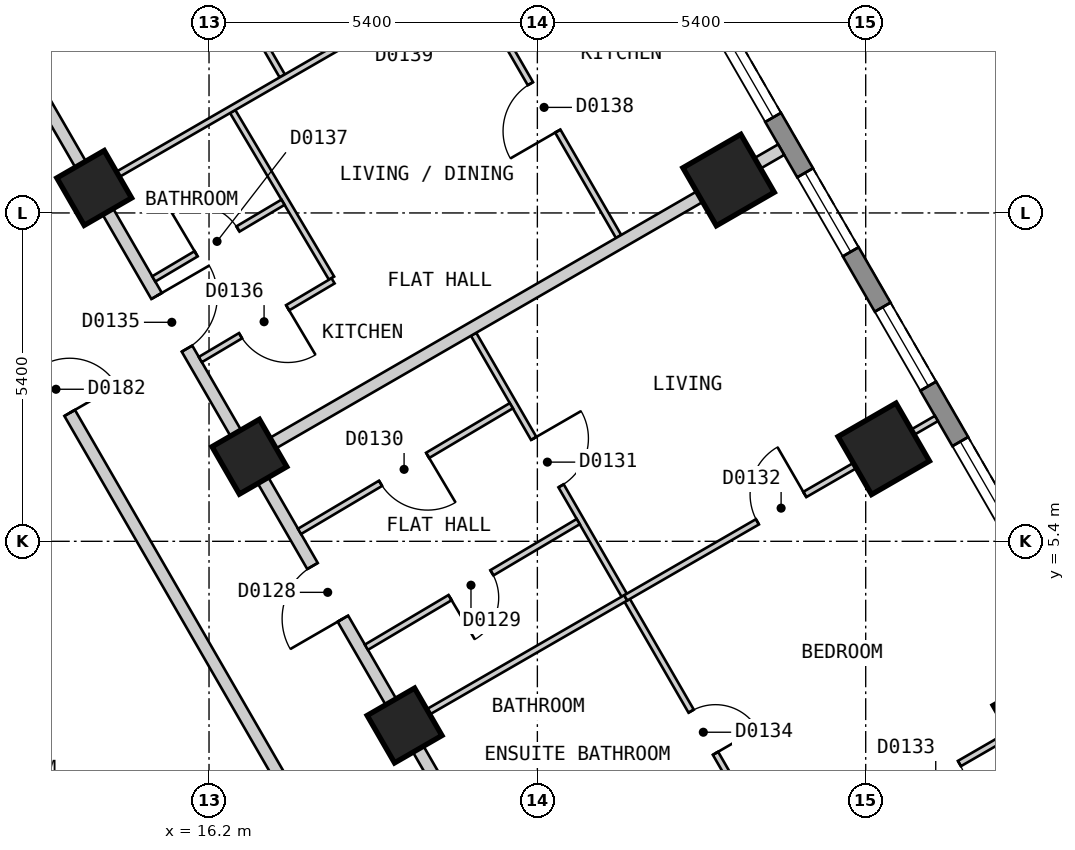
"""IFC4 building model, lengths in metres.
Left out: names, types, materials, properties, quantities, classifications, styles, units other than length and angle.
Written with IfcOpenShell. Run it as: python <this file> out.ifc"""

import sys

from ifc_helpers import new_model, si_unit, direction, frame, frame_2d, origin, origin_2d, place, context, subcontext, project, spatial, polyline, rectangle, outline, extrude, element, fill, save


model = new_model("IFC4")
c1 = context("Model", 3, precision=1e-05, world=origin(), true_north=direction((0.0, 1.0)))
c2 = subcontext(c1, "Body", "Model", "MODEL_VIEW")
j1 = project(units=[si_unit("LENGTHUNIT", "METRE"), si_unit("PLANEANGLEUNIT", "RADIAN")], contexts=[c1])
p1 = place(None, origin())
s1 = spatial("IfcSite", under=j1, at=p1, CompositionType="ELEMENT")
p2 = place(p1, origin())
s2 = spatial("IfcBuilding", under=s1, at=p2, CompositionType="ELEMENT")
p3 = place(p2, frame((0.0, 0.0, 29.4)))
s3 = spatial("IfcBuildingStorey", under=s2, at=p3, CompositionType="ELEMENT", Elevation=29.4)
for number, where, z_axis, x_axis in (
    (1, (29.848, 2.5, 0.0), (0.0, 0.0, 1.0), (-0.5, 0.866, 0.0)),
    (2, (27.297, 6.921, 0.0), (0.0, 0.0, 1.0), (-0.5, 0.866, 0.0)),
    (3, (24.745, 11.341, 0.0), (0.0, 0.0, 1.0), (-0.5, 0.866, 0.0)),
):
    element("IfcColumn", number, at=place(p3, frame(where, z_axis=z_axis, x_axis=x_axis)), inside=s3, PredefinedType="COLUMN", context=c2, shape_type="SweptSolid", body=[
        extrude(rectangle(XDim=1.1, YDim=1.1, at=origin_2d()), origin(), (0.0, 0.0, 1.0), 3.0),
    ])
for number, where, z_axis, x_axis in (
    (4, (19.416, 2.371, 0.0), (0.0, 0.0, 1.0), (-0.5, 0.866, 0.0)),
    (5, (16.864, 6.791, 0.0), (0.0, 0.0, 1.0), (-0.5, 0.866, 0.0)),
    (6, (14.312, 11.211, 0.0), (0.0, 0.0, 1.0), (-0.5, 0.866, 0.0)),
):
    element("IfcColumn", number, at=place(p3, frame(where, z_axis=z_axis, x_axis=x_axis)), inside=s3, PredefinedType="COLUMN", context=c2, shape_type="SweptSolid", body=[
        extrude(rectangle(XDim=0.9, YDim=0.9, at=origin_2d()), origin(), (0.0, 0.0, 1.0), 3.0),
    ])
p4 = place(p3, frame((31.22, 2.425, 0.0), z_axis=(0.0, 0.0, 1.0), x_axis=(-0.500001938803, 0.866024284413, 0.0)))
e7 = element("IfcWall", 7, at=p4, inside=s3, PredefinedType="SOLIDWALL", context=c2, shape_type="SweptSolid", body=[
    extrude(outline(polyline([(0.0, -0.15), (27.02, -0.15), (26.94, 0.15), (0.08, 0.15), (0.0, -0.15)])), origin(), (0.0, 0.0, 1.0), 2.7),
])
p5 = place(p4, frame((1.277, 0.0, 0.15)))
e8 = element("IfcOpeningElement", 8, at=p5, cuts=e7, PredefinedType="OPENING", context=c2, shape_type="SweptSolid", body=[
    extrude(rectangle(XDim=1.5, YDim=2.1, at=frame_2d((0.75, 1.05))), frame((0.0, 0.16, 0.0), z_axis=(0.0, -1.0, 0.0), x_axis=(1.0, 0.0, 0.0)), (0.0, 0.0, 1.0), 0.32),
])
p6 = place(p4, frame((3.829, 0.0, 0.15)))
e9 = element("IfcOpeningElement", 9, at=p6, cuts=e7, PredefinedType="OPENING", context=c2, shape_type="SweptSolid", body=[
    extrude(rectangle(XDim=1.5, YDim=2.1, at=frame_2d((0.75, 1.05))), frame((0.0, 0.16, 0.0), z_axis=(0.0, -1.0, 0.0), x_axis=(1.0, 0.0, 0.0)), (0.0, 0.0, 1.0), 0.32),
])
p7 = place(p4, frame((6.382, 0.0, 0.15)))
e10 = element("IfcOpeningElement", 10, at=p7, cuts=e7, PredefinedType="OPENING", context=c2, shape_type="SweptSolid", body=[
    extrude(rectangle(XDim=1.5, YDim=2.1, at=frame_2d((0.75, 1.05))), frame((0.0, 0.16, 0.0), z_axis=(0.0, -1.0, 0.0), x_axis=(1.0, 0.0, 0.0)), (0.0, 0.0, 1.0), 0.32),
])
p8 = place(p4, frame((8.933, 0.0, 0.15)))
e11 = element("IfcOpeningElement", 11, at=p8, cuts=e7, PredefinedType="OPENING", context=c2, shape_type="SweptSolid", body=[
    extrude(rectangle(XDim=1.5, YDim=2.1, at=frame_2d((0.75, 1.05))), frame((0.0, 0.16, 0.0), z_axis=(0.0, -1.0, 0.0), x_axis=(1.0, 0.0, 0.0)), (0.0, 0.0, 1.0), 0.32),
])
p9 = place(p4, frame((11.485, 0.0, 0.15)))
e12 = element("IfcOpeningElement", 12, at=p9, cuts=e7, PredefinedType="OPENING", context=c2, shape_type="SweptSolid", body=[
    extrude(rectangle(XDim=1.5, YDim=2.1, at=frame_2d((0.75, 1.05))), frame((0.0, 0.16, 0.0), z_axis=(0.0, -1.0, 0.0), x_axis=(1.0, 0.0, 0.0)), (0.0, 0.0, 1.0), 0.32),
])
p10 = place(p4, frame((14.037, 0.0, 0.15)))
e13 = element("IfcOpeningElement", 13, at=p10, cuts=e7, PredefinedType="OPENING", context=c2, shape_type="SweptSolid", body=[
    extrude(rectangle(XDim=1.5, YDim=2.1, at=frame_2d((0.75, 1.05))), frame((0.0, 0.16, 0.0), z_axis=(0.0, -1.0, 0.0), x_axis=(1.0, 0.0, 0.0)), (0.0, 0.0, 1.0), 0.32),
])
p11 = place(p4, frame((16.589, 0.0, 0.15)))
e14 = element("IfcOpeningElement", 14, at=p11, cuts=e7, PredefinedType="OPENING", context=c2, shape_type="SweptSolid", body=[
    extrude(rectangle(XDim=1.5, YDim=2.1, at=frame_2d((0.75, 1.05))), frame((0.0, 0.16, 0.0), z_axis=(0.0, -1.0, 0.0), x_axis=(1.0, 0.0, 0.0)), (0.0, 0.0, 1.0), 0.32),
])
p12 = place(p4, frame((19.141, 0.0, 0.15)))
e15 = element("IfcOpeningElement", 15, at=p12, cuts=e7, PredefinedType="OPENING", context=c2, shape_type="SweptSolid", body=[
    extrude(rectangle(XDim=1.5, YDim=2.1, at=frame_2d((0.75, 1.05))), frame((0.0, 0.16, 0.0), z_axis=(0.0, -1.0, 0.0), x_axis=(1.0, 0.0, 0.0)), (0.0, 0.0, 1.0), 0.32),
])
p13 = place(p4, frame((21.693, 0.0, 0.15)))
e16 = element("IfcOpeningElement", 16, at=p13, cuts=e7, PredefinedType="OPENING", context=c2, shape_type="SweptSolid", body=[
    extrude(rectangle(XDim=1.5, YDim=2.1, at=frame_2d((0.75, 1.05))), frame((0.0, 0.16, 0.0), z_axis=(0.0, -1.0, 0.0), x_axis=(1.0, 0.0, 0.0)), (0.0, 0.0, 1.0), 0.32),
])
p14 = place(p4, frame((24.244, 0.0, 0.15)))
e17 = element("IfcOpeningElement", 17, at=p14, cuts=e7, PredefinedType="OPENING", context=c2, shape_type="SweptSolid", body=[
    extrude(rectangle(XDim=1.5, YDim=2.1, at=frame_2d((0.75, 1.05))), frame((0.0, 0.16, 0.0), z_axis=(0.0, -1.0, 0.0), x_axis=(1.0, 0.0, 0.0)), (0.0, 0.0, 1.0), 0.32),
])
p15 = place(p3, frame((9.18, 15.7, 0.0), z_axis=(0.0, 0.0, 1.0), x_axis=(0.500003652032, -0.866023295272, 0.0)))
e18 = element("IfcWall", 18, at=p15, inside=s3, PredefinedType="PARTITIONING", context=c2, shape_type="SweptSolid", body=[
    extrude(rectangle(XDim=18.012, YDim=0.2, at=frame_2d((9.006, 0.0))), origin(), (0.0, 0.0, 1.0), 2.7),
])
p16 = place(p15, frame((8.556, 0.0, 0.0)))
e19 = element("IfcOpeningElement", 19, at=p16, cuts=e18, PredefinedType="OPENING", context=c2, shape_type="SweptSolid", body=[
    extrude(rectangle(XDim=0.9, YDim=2.1, at=frame_2d((0.45, 1.05))), frame((0.0, 0.11, 0.0), z_axis=(0.0, -1.0, 0.0), x_axis=(1.0, 0.0, 0.0)), (0.0, 0.0, 1.0), 0.22),
])
p17 = place(p3, frame((10.45, 17.9, 0.0), z_axis=(0.0, 0.0, 1.0), x_axis=(0.500034352617, -0.866005569383, 0.0)))
e20 = element("IfcWall", 20, at=p17, inside=s3, PredefinedType="PARTITIONING", context=c2, shape_type="SweptSolid", body=[
    extrude(rectangle(XDim=20.553, YDim=0.2, at=frame_2d((10.276, 0.0))), origin(), (0.0, 0.0, 1.0), 2.7),
])
p18 = place(p17, frame((14.903, 0.0, 0.0)))
e21 = element("IfcOpeningElement", 21, at=p18, cuts=e20, PredefinedType="OPENING", context=c2, shape_type="SweptSolid", body=[
    extrude(rectangle(XDim=1.0, YDim=2.1, at=frame_2d((0.5, 1.05))), frame((0.0, 0.11, 0.0), z_axis=(0.0, -1.0, 0.0), x_axis=(1.0, 0.0, 0.0)), (0.0, 0.0, 1.0), 0.22),
])
p19 = place(p17, frame((9.775, 0.0, 0.0)))
e22 = element("IfcOpeningElement", 22, at=p19, cuts=e20, PredefinedType="OPENING", context=c2, shape_type="SweptSolid", body=[
    extrude(rectangle(XDim=1.0, YDim=2.1, at=frame_2d((0.5, 1.05))), frame((0.0, 0.11, 0.0), z_axis=(0.0, -1.0, 0.0), x_axis=(1.0, 0.0, 0.0)), (0.0, 0.0, 1.0), 0.22),
])
p20 = place(p3, frame((16.589, 12.468, 0.0), z_axis=(0.0, 0.0, 1.0), x_axis=(0.510331599186, -0.859977708358, 0.0)))
e23 = element("IfcWall", 23, at=p20, inside=s3, PredefinedType="PARTITIONING", context=c2, shape_type="SweptSolid", body=[
    extrude(rectangle(XDim=3.186, YDim=0.1, at=frame_2d((1.593, 0.0))), origin(), (0.0, 0.0, 1.0), 2.7),
])
p21 = place(p3, frame((14.928, 17.344, 0.0), z_axis=(0.0, 0.0, 1.0), x_axis=(0.499881743012, -0.866093668724, 0.0)))
e24 = element("IfcWall", 24, at=p21, inside=s3, PredefinedType="PARTITIONING", context=c2, shape_type="SweptSolid", body=[
    extrude(rectangle(XDim=4.953, YDim=0.1, at=frame_2d((2.477, 0.0))), origin(), (0.0, 0.0, 1.0), 2.7),
])
p22 = place(p21, frame((2.052, 0.0, 0.0)))
e25 = element("IfcOpeningElement", 25, at=p22, cuts=e24, PredefinedType="OPENING", context=c2, shape_type="SweptSolid", body=[
    extrude(rectangle(XDim=0.8, YDim=2.1, at=frame_2d((0.4, 1.05))), frame((0.0, 0.06, 0.0), z_axis=(0.0, -1.0, 0.0), x_axis=(1.0, 0.0, 0.0)), (0.0, 0.0, 1.0), 0.12),
])
p23 = place(p3, frame((20.551, 8.805, 0.0), z_axis=(0.0, 0.0, 1.0), x_axis=(0.499984387913, -0.86603441724, 0.0)))
e26 = element("IfcWall", 26, at=p23, inside=s3, PredefinedType="PARTITIONING", context=c2, shape_type="SweptSolid", body=[
    extrude(rectangle(XDim=10.058, YDim=0.1, at=frame_2d((5.029, 0.0))), origin(), (0.0, 0.0, 1.0), 2.7),
])
p24 = place(p23, frame((1.978, 0.0, 0.0)))
e27 = element("IfcOpeningElement", 27, at=p24, cuts=e26, PredefinedType="OPENING", context=c2, shape_type="SweptSolid", body=[
    extrude(rectangle(XDim=0.9, YDim=2.1, at=frame_2d((0.45, 1.05))), frame((0.0, 0.06, 0.0), z_axis=(0.0, -1.0, 0.0), x_axis=(1.0, 0.0, 0.0)), (0.0, 0.0, 1.0), 0.12),
])
p25 = place(p23, frame((7.157, 0.0, 0.0)))
e28 = element("IfcOpeningElement", 28, at=p25, cuts=e26, PredefinedType="OPENING", context=c2, shape_type="SweptSolid", body=[
    extrude(rectangle(XDim=0.8, YDim=2.1, at=frame_2d((0.4, 1.05))), frame((0.0, 0.06, 0.0), z_axis=(0.0, -1.0, 0.0), x_axis=(1.0, 0.0, 0.0)), (0.0, 0.0, 1.0), 0.12),
])
p26 = place(p3, frame((20.46, 14.703, 0.0), z_axis=(0.0, 0.0, 1.0), x_axis=(0.499903082856, -0.866081351693, 0.0)))
e29 = element("IfcWall", 29, at=p26, inside=s3, PredefinedType="PARTITIONING", context=c2, shape_type="SweptSolid", body=[
    extrude(rectangle(XDim=4.953, YDim=0.1, at=frame_2d((2.477, 0.0))), origin(), (0.0, 0.0, 1.0), 2.7),
])
p27 = place(p26, frame((2.052, 0.0, 0.0)))
e30 = element("IfcOpeningElement", 30, at=p27, cuts=e29, PredefinedType="OPENING", context=c2, shape_type="SweptSolid", body=[
    extrude(rectangle(XDim=0.9, YDim=2.1, at=frame_2d((0.45, 1.05))), frame((0.0, 0.06, 0.0), z_axis=(0.0, -1.0, 0.0), x_axis=(1.0, 0.0, 0.0)), (0.0, 0.0, 1.0), 0.12),
])
p28 = place(p3, frame((19.503, 2.421, 0.0), z_axis=(0.0, 0.0, 1.0), x_axis=(0.866083434238, 0.499899474834, 0.0)))
e31 = element("IfcWall", 31, at=p28, inside=s3, PredefinedType="PARTITIONING", context=c2, shape_type="SweptSolid", body=[
    extrude(rectangle(XDim=4.099, YDim=0.1, at=frame_2d((2.049, 0.0))), origin(), (0.0, 0.0, 1.0), 2.7),
])
p29 = place(p3, frame((25.588, 0.041, 0.0), z_axis=(0.0, 0.0, 1.0), x_axis=(0.866113484451, 0.499847408768, 0.0)))
e32 = element("IfcWall", 32, at=p29, inside=s3, PredefinedType="PARTITIONING", context=c2, shape_type="SweptSolid", body=[
    extrude(rectangle(XDim=5.92, YDim=0.1, at=frame_2d((2.96, 0.0))), origin(), (0.0, 0.0, 1.0), 2.7),
])
p30 = place(p29, frame((2.51, 0.0, 0.0)))
e33 = element("IfcOpeningElement", 33, at=p30, cuts=e32, PredefinedType="OPENING", context=c2, shape_type="SweptSolid", body=[
    extrude(rectangle(XDim=0.9, YDim=2.1, at=frame_2d((0.45, 1.05))), frame((0.0, 0.06, 0.0), z_axis=(0.0, -1.0, 0.0), x_axis=(1.0, 0.0, 0.0)), (0.0, 0.0, 1.0), 0.12),
])
p31 = place(p3, frame((14.399, 11.261, 0.0), z_axis=(0.0, 0.0, 1.0), x_axis=(0.866022959057, 0.500004234368, 0.0)))
e34 = element("IfcWall", 34, at=p31, inside=s3, PredefinedType="PARTITIONING", context=c2, shape_type="SweptSolid", body=[
    extrude(rectangle(XDim=10.0, YDim=0.1, at=frame_2d((5.0, 0.0))), origin(), (0.0, 0.0, 1.0), 2.7),
])
p32 = place(p31, frame((4.775, 0.0, 0.0)))
e35 = element("IfcOpeningElement", 35, at=p32, cuts=e34, PredefinedType="OPENING", context=c2, shape_type="SweptSolid", body=[
    extrude(rectangle(XDim=0.9, YDim=2.1, at=frame_2d((0.45, 1.05))), frame((0.0, 0.06, 0.0), z_axis=(0.0, -1.0, 0.0), x_axis=(1.0, 0.0, 0.0)), (0.0, 0.0, 1.0), 0.12),
])
p33 = place(p3, frame((17.688, 5.563, 0.0), z_axis=(0.0, 0.0, 1.0), x_axis=(0.860050619918, 0.510208713351, 0.0)))
e36 = element("IfcWall", 36, at=p33, inside=s3, PredefinedType="PARTITIONING", context=c2, shape_type="SweptSolid", body=[
    extrude(rectangle(XDim=4.051, YDim=0.1, at=frame_2d((2.025, 0.0))), origin(), (0.0, 0.0, 1.0), 2.7),
])
p34 = place(p33, frame((1.55, 0.0, 0.0)))
e37 = element("IfcOpeningElement", 37, at=p34, cuts=e36, PredefinedType="OPENING", context=c2, shape_type="SweptSolid", body=[
    extrude(rectangle(XDim=0.9, YDim=2.1, at=frame_2d((0.45, 1.05))), frame((0.0, 0.06, 0.0), z_axis=(0.0, -1.0, 0.0), x_axis=(1.0, 0.0, 0.0)), (0.0, 0.0, 1.0), 0.12),
])
p35 = place(p3, frame((18.788, 3.658, 0.0), z_axis=(0.0, 0.0, 1.0), x_axis=(0.860114269096, 0.510101405701, 0.0)))
e38 = element("IfcWall", 38, at=p35, inside=s3, PredefinedType="PARTITIONING", context=c2, shape_type="SweptSolid", body=[
    extrude(rectangle(XDim=4.051, YDim=0.1, at=frame_2d((2.025, 0.0))), origin(), (0.0, 0.0, 1.0), 2.7),
])
p36 = place(p35, frame((1.6, 0.0, 0.0)))
e39 = element("IfcOpeningElement", 39, at=p36, cuts=e38, PredefinedType="OPENING", context=c2, shape_type="SweptSolid", body=[
    extrude(rectangle(XDim=0.8, YDim=2.1, at=frame_2d((0.4, 1.05))), frame((0.0, 0.06, 0.0), z_axis=(0.0, -1.0, 0.0), x_axis=(1.0, 0.0, 0.0)), (0.0, 0.0, 1.0), 0.12),
])
p37 = place(p3, frame((16.057, 8.389, 0.0), z_axis=(0.0, 0.0, 1.0), x_axis=(0.860036770423, 0.510232058499, 0.0)))
e40 = element("IfcWall", 40, at=p37, inside=s3, PredefinedType="PARTITIONING", context=c2, shape_type="SweptSolid", body=[
    extrude(rectangle(XDim=2.538, YDim=0.1, at=frame_2d((1.269, 0.0))), origin(), (0.0, 0.0, 1.0), 2.7),
])
p38 = place(p37, frame((0.769, 0.0, 0.0)))
e41 = element("IfcOpeningElement", 41, at=p38, cuts=e40, PredefinedType="OPENING", context=c2, shape_type="SweptSolid", body=[
    extrude(rectangle(XDim=0.9, YDim=2.1, at=frame_2d((0.45, 1.05))), frame((0.0, 0.06, 0.0), z_axis=(0.0, -1.0, 0.0), x_axis=(1.0, 0.0, 0.0)), (0.0, 0.0, 1.0), 0.12),
])
p39 = place(p3, frame((15.291, 9.715, 0.0), z_axis=(0.0, 0.0, 1.0), x_axis=(0.860087708271, 0.510146188932, 0.0)))
e42 = element("IfcWall", 42, at=p39, inside=s3, PredefinedType="PARTITIONING", context=c2, shape_type="SweptSolid", body=[
    extrude(rectangle(XDim=2.472, YDim=0.1, at=frame_2d((1.236, 0.0))), origin(), (0.0, 0.0, 1.0), 2.7),
])
p40 = place(p39, frame((0.81, 0.0, 0.0)))
e43 = element("IfcOpeningElement", 43, at=p40, cuts=e42, PredefinedType="OPENING", context=c2, shape_type="SweptSolid", body=[
    extrude(rectangle(XDim=0.8, YDim=2.1, at=frame_2d((0.4, 1.05))), frame((0.0, 0.06, 0.0), z_axis=(0.0, -1.0, 0.0), x_axis=(1.0, 0.0, 0.0)), (0.0, 0.0, 1.0), 0.12),
])
p41 = place(p3, frame((16.95, 6.841, 0.0), z_axis=(0.0, 0.0, 1.0), x_axis=(0.866022959057, 0.500004234368, 0.0)))
e44 = element("IfcWall", 44, at=p41, inside=s3, PredefinedType="PARTITIONING", context=c2, shape_type="SweptSolid", body=[
    extrude(rectangle(XDim=10.0, YDim=0.2, at=frame_2d((5.0, 0.0))), origin(), (0.0, 0.0, 1.0), 2.7),
])
p42 = place(p3, frame((23.053, 4.47, 0.0), z_axis=(0.0, 0.0, 1.0), x_axis=(0.866052608538, 0.499952877023, 0.0)))
e45 = element("IfcWall", 45, at=p42, inside=s3, PredefinedType="PARTITIONING", context=c2, shape_type="SweptSolid", body=[
    extrude(rectangle(XDim=5.9, YDim=0.1, at=frame_2d((2.95, 0.0))), origin(), (0.0, 0.0, 1.0), 2.7),
])
p43 = place(p42, frame((2.501, 0.0, 0.0)))
e46 = element("IfcOpeningElement", 46, at=p43, cuts=e45, PredefinedType="OPENING", context=c2, shape_type="SweptSolid", body=[
    extrude(rectangle(XDim=0.9, YDim=2.1, at=frame_2d((0.45, 1.05))), frame((0.0, 0.06, 0.0), z_axis=(0.0, -1.0, 0.0), x_axis=(1.0, 0.0, 0.0)), (0.0, 0.0, 1.0), 0.12),
])
p44 = place(p6, origin())
e47 = element("IfcWindow", 47, at=p44, inside=s3, PartitioningType="SINGLE_PANEL", PredefinedType="WINDOW", context=c2, shape_type="SweptSolid", body=[
    extrude(rectangle(XDim=1.5, YDim=2.1, at=frame_2d((0.75, 1.05))), frame((0.0, 0.03, 0.0), z_axis=(0.0, -1.0, 0.0), x_axis=(1.0, 0.0, 0.0)), (0.0, 0.0, 1.0), 0.06),
])
fill(e9, e47)
p45 = place(p7, origin())
e48 = element("IfcWindow", 48, at=p45, inside=s3, PartitioningType="SINGLE_PANEL", PredefinedType="WINDOW", context=c2, shape_type="SweptSolid", body=[
    extrude(rectangle(XDim=1.5, YDim=2.1, at=frame_2d((0.75, 1.05))), frame((0.0, 0.03, 0.0), z_axis=(0.0, -1.0, 0.0), x_axis=(1.0, 0.0, 0.0)), (0.0, 0.0, 1.0), 0.06),
])
fill(e10, e48)
p46 = place(p8, origin())
e49 = element("IfcWindow", 49, at=p46, inside=s3, PartitioningType="SINGLE_PANEL", PredefinedType="WINDOW", context=c2, shape_type="SweptSolid", body=[
    extrude(rectangle(XDim=1.5, YDim=2.1, at=frame_2d((0.75, 1.05))), frame((0.0, 0.03, 0.0), z_axis=(0.0, -1.0, 0.0), x_axis=(1.0, 0.0, 0.0)), (0.0, 0.0, 1.0), 0.06),
])
fill(e11, e49)
p47 = place(p9, origin())
e50 = element("IfcWindow", 50, at=p47, inside=s3, PartitioningType="SINGLE_PANEL", PredefinedType="WINDOW", context=c2, shape_type="SweptSolid", body=[
    extrude(rectangle(XDim=1.5, YDim=2.1, at=frame_2d((0.75, 1.05))), frame((0.0, 0.03, 0.0), z_axis=(0.0, -1.0, 0.0), x_axis=(1.0, 0.0, 0.0)), (0.0, 0.0, 1.0), 0.06),
])
fill(e12, e50)
p48 = place(p18, origin())
e51 = element("IfcDoor", 51, at=p48, inside=s3, OperationType="SINGLE_SWING_RIGHT", PredefinedType="DOOR", context=c2, shape_type="SweptSolid", body=[
    extrude(rectangle(XDim=1.0, YDim=2.1, at=frame_2d((0.5, 1.05))), frame((0.0, 0.025, 0.0), z_axis=(0.0, -1.0, 0.0), x_axis=(1.0, 0.0, 0.0)), (0.0, 0.0, 1.0), 0.05),
])
fill(e21, e51)
p49 = place(p36, origin())
e52 = element("IfcDoor", 52, at=p49, inside=s3, OperationType="SINGLE_SWING_LEFT", PredefinedType="DOOR", context=c2, shape_type="SweptSolid", body=[
    extrude(rectangle(XDim=0.8, YDim=2.1, at=frame_2d((0.4, 1.05))), frame((0.0, 0.025, 0.0), z_axis=(0.0, -1.0, 0.0), x_axis=(1.0, 0.0, 0.0)), (0.0, 0.0, 1.0), 0.05),
])
fill(e39, e52)
p50 = place(p34, origin())
e53 = element("IfcDoor", 53, at=p50, inside=s3, OperationType="SINGLE_SWING_RIGHT", PredefinedType="DOOR", context=c2, shape_type="SweptSolid", body=[
    extrude(rectangle(XDim=0.9, YDim=2.1, at=frame_2d((0.45, 1.05))), frame((0.0, 0.025, 0.0), z_axis=(0.0, -1.0, 0.0), x_axis=(1.0, 0.0, 0.0)), (0.0, 0.0, 1.0), 0.05),
])
fill(e37, e53)
p51 = place(p24, origin())
e54 = element("IfcDoor", 54, at=p51, inside=s3, OperationType="SINGLE_SWING_LEFT", PredefinedType="DOOR", context=c2, shape_type="SweptSolid", body=[
    extrude(rectangle(XDim=0.9, YDim=2.1, at=frame_2d((0.45, 1.05))), frame((0.0, 0.025, 0.0), z_axis=(0.0, -1.0, 0.0), x_axis=(1.0, 0.0, 0.0)), (0.0, 0.0, 1.0), 0.05),
])
fill(e27, e54)
p52 = place(p43, origin())
e55 = element("IfcDoor", 55, at=p52, inside=s3, OperationType="SINGLE_SWING_RIGHT", PredefinedType="DOOR", context=c2, shape_type="SweptSolid", body=[
    extrude(rectangle(XDim=0.9, YDim=2.1, at=frame_2d((0.45, 1.05))), frame((0.0, 0.025, 0.0), z_axis=(0.0, -1.0, 0.0), x_axis=(1.0, 0.0, 0.0)), (0.0, 0.0, 1.0), 0.05),
])
fill(e46, e55)
p53 = place(p30, origin())
e56 = element("IfcDoor", 56, at=p53, inside=s3, OperationType="SINGLE_SWING_LEFT", PredefinedType="DOOR", context=c2, shape_type="SweptSolid", body=[
    extrude(rectangle(XDim=0.9, YDim=2.1, at=frame_2d((0.45, 1.05))), frame((0.0, 0.025, 0.0), z_axis=(0.0, -1.0, 0.0), x_axis=(1.0, 0.0, 0.0)), (0.0, 0.0, 1.0), 0.05),
])
fill(e33, e56)
p54 = place(p25, origin())
e57 = element("IfcDoor", 57, at=p54, inside=s3, OperationType="SINGLE_SWING_RIGHT", PredefinedType="DOOR", context=c2, shape_type="SweptSolid", body=[
    extrude(rectangle(XDim=0.8, YDim=2.1, at=frame_2d((0.4, 1.05))), frame((0.0, 0.025, 0.0), z_axis=(0.0, -1.0, 0.0), x_axis=(1.0, 0.0, 0.0)), (0.0, 0.0, 1.0), 0.05),
])
fill(e28, e57)
p55 = place(p19, origin())
e58 = element("IfcDoor", 58, at=p55, inside=s3, OperationType="SINGLE_SWING_LEFT", PredefinedType="DOOR", context=c2, shape_type="SweptSolid", body=[
    extrude(rectangle(XDim=1.0, YDim=2.1, at=frame_2d((0.5, 1.05))), frame((0.0, 0.025, 0.0), z_axis=(0.0, -1.0, 0.0), x_axis=(1.0, 0.0, 0.0)), (0.0, 0.0, 1.0), 0.05),
])
fill(e22, e58)
p56 = place(p38, origin())
e59 = element("IfcDoor", 59, at=p56, inside=s3, OperationType="SINGLE_SWING_RIGHT", PredefinedType="DOOR", context=c2, shape_type="SweptSolid", body=[
    extrude(rectangle(XDim=0.9, YDim=2.1, at=frame_2d((0.45, 1.05))), frame((0.0, 0.025, 0.0), z_axis=(0.0, -1.0, 0.0), x_axis=(1.0, 0.0, 0.0)), (0.0, 0.0, 1.0), 0.05),
])
fill(e41, e59)
p57 = place(p40, origin())
e60 = element("IfcDoor", 60, at=p57, inside=s3, OperationType="SINGLE_SWING_LEFT", PredefinedType="DOOR", context=c2, shape_type="SweptSolid", body=[
    extrude(rectangle(XDim=0.8, YDim=2.1, at=frame_2d((0.4, 1.05))), frame((0.0, 0.025, 0.0), z_axis=(0.0, -1.0, 0.0), x_axis=(1.0, 0.0, 0.0)), (0.0, 0.0, 1.0), 0.05),
])
fill(e43, e60)
p58 = place(p27, origin())
e61 = element("IfcDoor", 61, at=p58, inside=s3, OperationType="SINGLE_SWING_RIGHT", PredefinedType="DOOR", context=c2, shape_type="SweptSolid", body=[
    extrude(rectangle(XDim=0.9, YDim=2.1, at=frame_2d((0.45, 1.05))), frame((0.0, 0.025, 0.0), z_axis=(0.0, -1.0, 0.0), x_axis=(1.0, 0.0, 0.0)), (0.0, 0.0, 1.0), 0.05),
])
fill(e30, e61)
p59 = place(p16, origin())
e62 = element("IfcDoor", 62, at=p59, inside=s3, OperationType="SINGLE_SWING_RIGHT", PredefinedType="DOOR", context=c2, shape_type="SweptSolid", body=[
    extrude(rectangle(XDim=0.9, YDim=2.1, at=frame_2d((0.45, 1.05))), frame((0.0, 0.025, 0.0), z_axis=(0.0, -1.0, 0.0), x_axis=(1.0, 0.0, 0.0)), (0.0, 0.0, 1.0), 0.05),
])
fill(e19, e62)
save(model, sys.argv[1])
